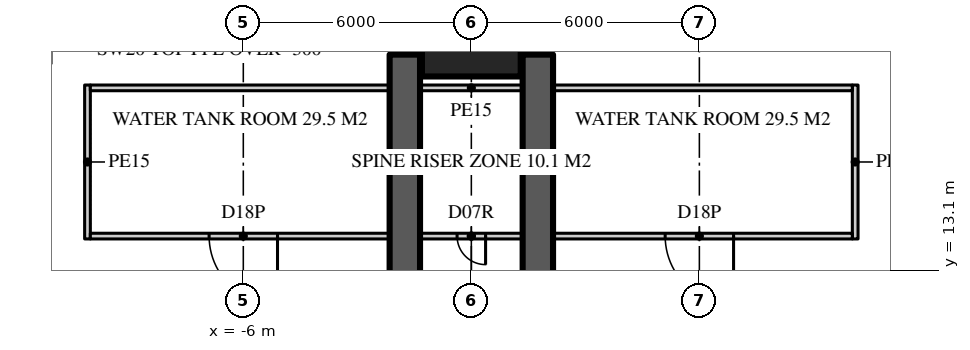
"""IFC4 building model, lengths in metres.
Left out: names, types, materials, properties, quantities, classifications, styles, units other than length and angle.
Written with IfcOpenShell. Run it as: python <this file> out.ifc"""

import sys

from ifc_helpers import new_model, si_unit, direction, frame, frame_2d, origin, origin_2d, place, context, subcontext, project, spatial, rectangle, extrude, element, fill, save


model = new_model("IFC4")
c1 = context("Model", 3, precision=1e-05, world=origin(), true_north=direction((0.0, 1.0)))
c2 = subcontext(c1, "Body", "Model", "MODEL_VIEW")
j1 = project(units=[si_unit("LENGTHUNIT", "METRE"), si_unit("PLANEANGLEUNIT", "RADIAN")], contexts=[c1])
p1 = place(None, origin())
s1 = spatial("IfcSite", under=j1, at=p1, CompositionType="ELEMENT")
p2 = place(p1, origin())
s2 = spatial("IfcBuilding", under=s1, at=p2, CompositionType="ELEMENT")
p3 = place(p2, frame((0.0, 0.0, -10.0)))
s3 = spatial("IfcBuildingStorey", under=s2, at=p3, CompositionType="ELEMENT", Elevation=-10.0)
for number, where, z_axis, x_axis in (
    (1, (1.75, 11.15, 0.0), (0.0, 0.0, 1.0), (0.0, 1.0, 0.0)),
    (2, (-1.75, 11.15, 0.0), (0.0, 0.0, 1.0), (0.0, 1.0, 0.0)),
):
    element("IfcWall", number, at=place(p3, frame(where, z_axis=z_axis, x_axis=x_axis)), inside=s3, PredefinedType="SHEAR", context=c2, shape_type="SweptSolid", body=[
        extrude(rectangle(XDim=7.625, YDim=0.8, at=frame_2d((3.812, 0.0))), origin(), (0.0, 0.0, 1.0), 5.0),
    ])
p4 = place(p3, frame((0.0, 19.5, 0.0), z_axis=(0.0, 0.0, 1.0), x_axis=(1.0, 0.0, 0.0)))
e3 = element("IfcColumn", 3, at=p4, inside=s3, PredefinedType="COLUMN", context=c2, shape_type="SweptSolid", body=[
    extrude(rectangle(XDim=2.6, YDim=2.6, at=origin_2d()), origin(), (0.0, 0.0, 1.0), 5.0),
])
for number, where, z_axis, x_axis in (
    (4, (10.1, 13.925, 0.0), (0.0, 0.0, 1.0), (0.0, 1.0, 0.0)),
    (5, (-10.1, 13.925, 0.0), (0.0, 0.0, 1.0), (0.0, 1.0, 0.0)),
):
    element("IfcWall", number, at=place(p3, frame(where, z_axis=z_axis, x_axis=x_axis)), inside=s3, PredefinedType="SOLIDWALL", context=c2, shape_type="SweptSolid", body=[
        extrude(rectangle(XDim=4.05, YDim=0.15, at=frame_2d((2.025, 0.0))), origin(), (0.0, 0.0, 1.0), 4.7),
    ])
p5 = place(p3, frame((10.025, 17.9, 0.0), z_axis=(0.0, 0.0, 1.0), x_axis=(-1.0, 0.0, 0.0)))
e6 = element("IfcWall", 6, at=p5, inside=s3, PredefinedType="SOLIDWALL", context=c2, shape_type="SweptSolid", body=[
    extrude(rectangle(XDim=20.05, YDim=0.15, at=frame_2d((10.025, 0.0))), origin(), (0.0, 0.0, 1.0), 4.7),
])
p6 = place(p3, frame((10.025, 14.0, 0.0), z_axis=(0.0, 0.0, 1.0), x_axis=(-1.0, 0.0, 0.0)))
e7 = element("IfcWall", 7, at=p6, inside=s3, PredefinedType="SOLIDWALL", context=c2, shape_type="SweptSolid", body=[
    extrude(rectangle(XDim=20.05, YDim=0.15, at=frame_2d((10.025, 0.0))), origin(), (0.0, 0.0, 1.0), 4.7),
])
p7 = place(p6, frame((9.65, 0.0, 0.0)))
e8 = element("IfcOpeningElement", 8, at=p7, cuts=e7, PredefinedType="OPENING", context=c2, shape_type="SweptSolid", body=[
    extrude(rectangle(XDim=0.75, YDim=2.1, at=frame_2d((0.375, 1.05))), frame((0.0, 0.085, 0.0), z_axis=(0.0, -1.0, 0.0), x_axis=(1.0, 0.0, 0.0)), (0.0, 0.0, 1.0), 0.17),
])
p8 = place(p6, frame((3.125, 0.0, 0.0)))
e9 = element("IfcOpeningElement", 9, at=p8, cuts=e7, PredefinedType="OPENING", context=c2, shape_type="SweptSolid", body=[
    extrude(rectangle(XDim=1.8, YDim=2.4, at=frame_2d((0.9, 1.2))), frame((0.0, 0.085, 0.0), z_axis=(0.0, -1.0, 0.0), x_axis=(1.0, 0.0, 0.0)), (0.0, 0.0, 1.0), 0.17),
])
p9 = place(p6, frame((15.125, 0.0, 0.0)))
e10 = element("IfcOpeningElement", 10, at=p9, cuts=e7, PredefinedType="OPENING", context=c2, shape_type="SweptSolid", body=[
    extrude(rectangle(XDim=1.8, YDim=2.4, at=frame_2d((0.9, 1.2))), frame((0.0, 0.085, 0.0), z_axis=(0.0, -1.0, 0.0), x_axis=(1.0, 0.0, 0.0)), (0.0, 0.0, 1.0), 0.17),
])
p10 = place(p7, origin())
e11 = element("IfcDoor", 11, at=p10, inside=s3, OperationType="SINGLE_SWING_LEFT", PredefinedType="DOOR", context=c2, shape_type="SweptSolid", body=[
    extrude(rectangle(XDim=0.75, YDim=2.1, at=frame_2d((0.375, 1.05))), frame((0.0, 0.025, 0.0), z_axis=(0.0, -1.0, 0.0), x_axis=(1.0, 0.0, 0.0)), (0.0, 0.0, 1.0), 0.05),
])
fill(e8, e11)
p11 = place(p8, origin())
e12 = element("IfcDoor", 12, at=p11, inside=s3, OperationType="DOUBLE_DOOR_DOUBLE_SWING", PredefinedType="DOOR", context=c2, shape_type="SweptSolid", body=[
    extrude(rectangle(XDim=1.8, YDim=2.4, at=frame_2d((0.9, 1.2))), frame((0.0, 0.025, 0.0), z_axis=(0.0, -1.0, 0.0), x_axis=(1.0, 0.0, 0.0)), (0.0, 0.0, 1.0), 0.05),
])
fill(e9, e12)
p12 = place(p9, origin())
e13 = element("IfcDoor", 13, at=p12, inside=s3, OperationType="DOUBLE_DOOR_DOUBLE_SWING", PredefinedType="DOOR", context=c2, shape_type="SweptSolid", body=[
    extrude(rectangle(XDim=1.8, YDim=2.4, at=frame_2d((0.9, 1.2))), frame((0.0, 0.025, 0.0), z_axis=(0.0, -1.0, 0.0), x_axis=(1.0, 0.0, 0.0)), (0.0, 0.0, 1.0), 0.05),
])
fill(e10, e13)
save(model, sys.argv[1])
